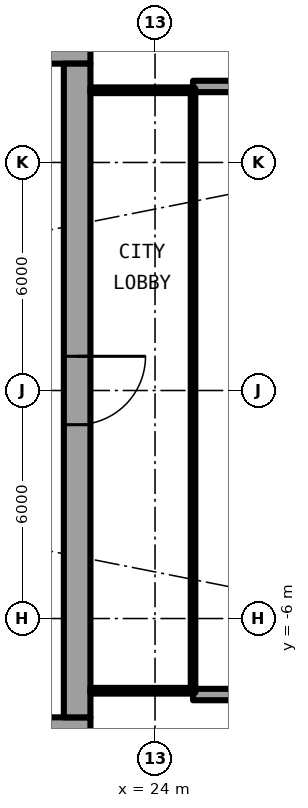
"""IFC4 building model, lengths in metres.
Left out: names, types, materials, properties, quantities, classifications, styles, units other than length and angle.
Written with IfcOpenShell. Run it as: python <this file> out.ifc"""

import sys

from ifc_helpers import new_model, si_unit, direction, frame, frame_2d, origin, place, context, subcontext, project, spatial, rectangle, extrude, element, fill, save


model = new_model("IFC4")
c1 = context("Model", 3, precision=1e-05, world=origin(), true_north=direction((0.0, 1.0)))
c2 = subcontext(c1, "Body", "Model", "MODEL_VIEW")
j1 = project(units=[si_unit("LENGTHUNIT", "METRE"), si_unit("PLANEANGLEUNIT", "RADIAN")], contexts=[c1])
p1 = place(None, origin())
s1 = spatial("IfcSite", under=j1, at=p1, CompositionType="ELEMENT")
p2 = place(p1, origin())
s2 = spatial("IfcBuilding", under=s1, at=p2, CompositionType="ELEMENT")
p3 = place(p2, frame((0.0, 0.0, 88.0)))
s3 = spatial("IfcBuildingStorey", under=s2, at=p3, CompositionType="ELEMENT", Elevation=88.0)
for number, where, z_axis, x_axis in (
    (1, (25.0, 8.0, 0.0), (0.0, 0.0, 1.0), (1.0, 0.0, 0.0)),
    (2, (25.0, -8.0, 0.0), (0.0, 0.0, 1.0), (1.0, 0.0, 0.0)),
):
    element("IfcWall", number, at=place(p3, frame(where, z_axis=z_axis, x_axis=x_axis)), inside=s3, PredefinedType="SOLIDWALL", context=c2, shape_type="SweptSolid", body=[
        extrude(rectangle(XDim=2.667, YDim=0.3, at=frame_2d((1.333, 0.0))), origin(), (0.0, 0.0, 1.0), 2.7),
    ])
p4 = place(p3, frame((22.3, 8.95, 0.0), z_axis=(0.0, 0.0, 1.0), x_axis=(-1.0, 0.0, 0.0)))
e3 = element("IfcWall", 3, at=p4, inside=s3, PredefinedType="SHEAR", context=c2, shape_type="SweptSolid", body=[
    extrude(rectangle(XDim=14.0, YDim=0.7, at=frame_2d((7.0, 0.0))), origin(), (0.0, 0.0, 1.0), 3.05),
])
p5 = place(p4, frame((1.225, 0.0, 0.0)))
e4 = element("IfcOpeningElement", 4, at=p5, cuts=e3, PredefinedType="OPENING", context=c2, shape_type="SweptSolid", body=[
    extrude(rectangle(XDim=1.2, YDim=2.3, at=frame_2d((0.6, 1.15))), frame((0.0, 0.36, 0.0), z_axis=(0.0, -1.0, 0.0), x_axis=(1.0, 0.0, 0.0)), (0.0, 0.0, 1.0), 0.72),
])
p6 = place(p3, frame((8.3, -8.95, 0.0), z_axis=(0.0, 0.0, 1.0), x_axis=(1.0, 0.0, 0.0)))
e5 = element("IfcWall", 5, at=p6, inside=s3, PredefinedType="SHEAR", context=c2, shape_type="SweptSolid", body=[
    extrude(rectangle(XDim=14.0, YDim=0.7, at=frame_2d((7.0, 0.0))), origin(), (0.0, 0.0, 1.0), 3.05),
])
p7 = place(p6, frame((11.575, 0.0, 0.0)))
e6 = element("IfcOpeningElement", 6, at=p7, cuts=e5, PredefinedType="OPENING", context=c2, shape_type="SweptSolid", body=[
    extrude(rectangle(XDim=1.2, YDim=2.3, at=frame_2d((0.6, 1.15))), frame((0.0, 0.36, 0.0), z_axis=(0.0, -1.0, 0.0), x_axis=(1.0, 0.0, 0.0)), (0.0, 0.0, 1.0), 0.72),
])
p8 = place(p3, frame((21.95, 8.6, 0.0), z_axis=(0.0, 0.0, 1.0), x_axis=(0.0, -1.0, 0.0)))
e7 = element("IfcWall", 7, at=p8, inside=s3, PredefinedType="SHEAR", context=c2, shape_type="SweptSolid", body=[
    extrude(rectangle(XDim=17.2, YDim=0.7, at=frame_2d((8.6, 0.0))), origin(), (0.0, 0.0, 1.0), 3.05),
])
p9 = place(p8, frame((7.7, 0.0, 0.0)))
e8 = element("IfcOpeningElement", 8, at=p9, cuts=e7, PredefinedType="OPENING", context=c2, shape_type="SweptSolid", body=[
    extrude(rectangle(XDim=1.8, YDim=2.3, at=frame_2d((0.9, 1.15))), frame((0.0, 0.36, 0.0), z_axis=(0.0, -1.0, 0.0), x_axis=(1.0, 0.0, 0.0)), (0.0, 0.0, 1.0), 0.72),
])
for number, where, z_axis, x_axis in (
    (9, (22.3, -7.9, 0.0), (0.0, 0.0, 1.0), (1.0, 0.0, 0.0)),
    (10, (22.3, 7.9, 0.0), (0.0, 0.0, 1.0), (1.0, 0.0, 0.0)),
):
    element("IfcWall", number, at=place(p3, frame(where, z_axis=z_axis, x_axis=x_axis)), inside=s3, PredefinedType="PARTITIONING", context=c2, shape_type="SweptSolid", body=[
        extrude(rectangle(XDim=2.64, YDim=0.15, at=frame_2d((1.32, 0.0))), origin(), (0.0, 0.0, 1.0), 2.7),
    ])
p10 = place(p3, frame((25.0, -7.95, 0.0), z_axis=(0.0, 0.0, 1.0), x_axis=(0.0, 1.0, 0.0)))
e11 = element("IfcWall", 11, at=p10, inside=s3, PredefinedType="PARTITIONING", context=c2, shape_type="SweptSolid", body=[
    extrude(rectangle(XDim=15.9, YDim=0.12, at=frame_2d((7.95, 0.0))), origin(), (0.0, 0.0, 1.0), 2.7),
])
p11 = place(p10, frame((0.95, 0.0, 0.1)))
e12 = element("IfcOpeningElement", 12, at=p11, cuts=e11, PredefinedType="OPENING", context=c2, shape_type="SweptSolid", body=[
    extrude(rectangle(XDim=14.0, YDim=2.35, at=frame_2d((7.0, 1.175))), frame((0.0, 0.07, 0.0), z_axis=(0.0, -1.0, 0.0), x_axis=(1.0, 0.0, 0.0)), (0.0, 0.0, 1.0), 0.14),
])
p12 = place(p9, origin())
e13 = element("IfcDoor", 13, at=p12, inside=s3, OperationType="SINGLE_SWING_LEFT", PredefinedType="DOOR", context=c2, shape_type="SweptSolid", body=[
    extrude(rectangle(XDim=1.8, YDim=2.3, at=frame_2d((0.9, 1.15))), frame((0.0, 0.025, 0.0), z_axis=(0.0, -1.0, 0.0), x_axis=(1.0, 0.0, 0.0)), (0.0, 0.0, 1.0), 0.05),
])
fill(e8, e13)
p13 = place(p11, origin())
e14 = element("IfcWindow", 14, at=p13, inside=s3, PartitioningType="SINGLE_PANEL", PredefinedType="WINDOW", context=c2, shape_type="SweptSolid", body=[
    extrude(rectangle(XDim=14.0, YDim=2.35, at=frame_2d((7.0, 1.175))), frame((0.0, 0.03, 0.0), z_axis=(0.0, -1.0, 0.0), x_axis=(1.0, 0.0, 0.0)), (0.0, 0.0, 1.0), 0.06),
])
fill(e12, e14)
save(model, sys.argv[1])
